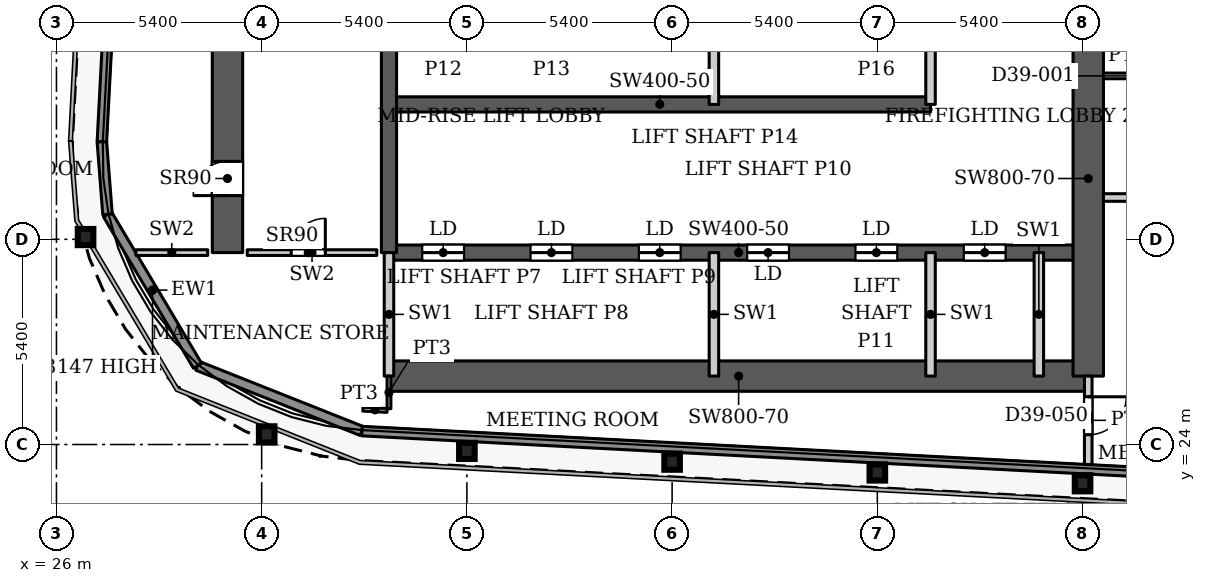
"""IFC4 building model, lengths in metres.
Left out: names, types, materials, properties, quantities, classifications, styles, units other than length and angle.
Written with IfcOpenShell. Run it as: python <this file> out.ifc"""

import sys

from ifc_helpers import new_model, si_unit, direction, frame, frame_2d, origin, origin_2d, place, context, subcontext, project, spatial, rectangle, i_section, extrude, source, transform, mapped, element, fill, save


model = new_model("IFC4")
c1 = context("Model", 3, precision=1e-05, world=origin(), true_north=direction((0.0, 1.0)))
c2 = subcontext(c1, "Body", "Model", "MODEL_VIEW")
j1 = project(units=[si_unit("LENGTHUNIT", "METRE"), si_unit("PLANEANGLEUNIT", "RADIAN")], contexts=[c1])
p1 = place(None, origin())
s1 = spatial("IfcSite", under=j1, at=p1, CompositionType="ELEMENT")
p2 = place(p1, origin())
s2 = spatial("IfcBuilding", under=s1, at=p2, CompositionType="ELEMENT")
p3 = place(p2, frame((0.0, 0.0, 168.2)))
s3 = spatial("IfcBuildingStorey", under=s2, at=p3, CompositionType="ELEMENT", Elevation=168.2)
for number, where, z_axis, x_axis in (
    (1, (53.0, 22.98, 0.0), (0.0, 0.0, 1.0), (1.0, 0.0, 0.0)),
    (2, (47.6, 23.264, 0.0), (0.0, 0.0, 1.0), (1.0, 0.0, 0.0)),
    (3, (42.2, 23.548, 0.0), (0.0, 0.0, 1.0), (1.0, 0.0, 0.0)),
    (4, (36.8, 23.832, 0.0), (0.0, 0.0, 1.0), (1.0, 0.0, 0.0)),
    (5, (31.532, 24.266, 0.0), (0.0, 0.0, 1.0), (1.0, 0.0, 0.0)),
    (6, (26.766, 29.459, 0.0), (0.0, 0.0, 1.0), (1.0, 0.0, 0.0)),
):
    element("IfcColumn", number, at=place(p3, frame(where, z_axis=z_axis, x_axis=x_axis)), inside=s3, PredefinedType="COLUMN", context=c2, shape_type="SweptSolid", body=[
        extrude(i_section(OverallWidth=0.409, OverallDepth=0.425, WebThickness=0.033, FlangeThickness=0.052, FilletRadius=0.013, at=origin_2d()), origin(), (0.0, 0.0, 1.0), 3.9),
    ])
p4 = place(p3, frame((34.75, 25.8, 0.0), z_axis=(0.0, 0.0, 1.0), x_axis=(1.0, 0.0, 0.0)))
e7 = element("IfcWall", 7, at=p4, inside=s3, PredefinedType="SHEAR", context=c2, shape_type="SweptSolid", body=[
    extrude(rectangle(XDim=18.4, YDim=0.8, at=frame_2d((9.2, 0.0))), origin(), (0.0, 0.0, 1.0), 3.9),
])
p5 = place(p3, frame((34.75, 29.05, 0.0), z_axis=(0.0, 0.0, 1.0), x_axis=(1.0, 0.0, 0.0)))
e8 = element("IfcWall", 8, at=p5, inside=s3, PredefinedType="SHEAR", context=c2, shape_type="SweptSolid", body=[
    extrude(rectangle(XDim=18.4, YDim=0.4, at=frame_2d((9.2, 0.0))), origin(), (0.0, 0.0, 1.0), 3.9),
])
p6 = place(p5, frame((0.875, 0.0, 0.0)))
e9 = element("IfcOpeningElement", 9, at=p6, cuts=e8, PredefinedType="OPENING", context=c2, shape_type="SweptSolid", body=[
    extrude(rectangle(XDim=1.1, YDim=2.2, at=frame_2d((0.55, 1.1))), frame((0.0, 0.21, 0.0), z_axis=(0.0, -1.0, 0.0), x_axis=(1.0, 0.0, 0.0)), (0.0, 0.0, 1.0), 0.42),
])
p7 = place(p5, frame((3.725, 0.0, 0.0)))
e10 = element("IfcOpeningElement", 10, at=p7, cuts=e8, PredefinedType="OPENING", context=c2, shape_type="SweptSolid", body=[
    extrude(rectangle(XDim=1.1, YDim=2.2, at=frame_2d((0.55, 1.1))), frame((0.0, 0.21, 0.0), z_axis=(0.0, -1.0, 0.0), x_axis=(1.0, 0.0, 0.0)), (0.0, 0.0, 1.0), 0.42),
])
p8 = place(p5, frame((6.575, 0.0, 0.0)))
e11 = element("IfcOpeningElement", 11, at=p8, cuts=e8, PredefinedType="OPENING", context=c2, shape_type="SweptSolid", body=[
    extrude(rectangle(XDim=1.1, YDim=2.2, at=frame_2d((0.55, 1.1))), frame((0.0, 0.21, 0.0), z_axis=(0.0, -1.0, 0.0), x_axis=(1.0, 0.0, 0.0)), (0.0, 0.0, 1.0), 0.42),
])
p9 = place(p5, frame((9.425, 0.0, 0.0)))
e12 = element("IfcOpeningElement", 12, at=p9, cuts=e8, PredefinedType="OPENING", context=c2, shape_type="SweptSolid", body=[
    extrude(rectangle(XDim=1.1, YDim=2.2, at=frame_2d((0.55, 1.1))), frame((0.0, 0.21, 0.0), z_axis=(0.0, -1.0, 0.0), x_axis=(1.0, 0.0, 0.0)), (0.0, 0.0, 1.0), 0.42),
])
p10 = place(p5, frame((12.275, 0.0, 0.0)))
e13 = element("IfcOpeningElement", 13, at=p10, cuts=e8, PredefinedType="OPENING", context=c2, shape_type="SweptSolid", body=[
    extrude(rectangle(XDim=1.1, YDim=2.2, at=frame_2d((0.55, 1.1))), frame((0.0, 0.21, 0.0), z_axis=(0.0, -1.0, 0.0), x_axis=(1.0, 0.0, 0.0)), (0.0, 0.0, 1.0), 0.42),
])
p11 = place(p5, frame((15.125, 0.0, 0.0)))
e14 = element("IfcOpeningElement", 14, at=p11, cuts=e8, PredefinedType="OPENING", context=c2, shape_type="SweptSolid", body=[
    extrude(rectangle(XDim=1.1, YDim=2.2, at=frame_2d((0.55, 1.1))), frame((0.0, 0.21, 0.0), z_axis=(0.0, -1.0, 0.0), x_axis=(1.0, 0.0, 0.0)), (0.0, 0.0, 1.0), 0.42),
])
p12 = place(p3, frame((34.75, 32.95, 0.0), z_axis=(0.0, 0.0, 1.0), x_axis=(1.0, 0.0, 0.0)))
e15 = element("IfcWall", 15, at=p12, inside=s3, PredefinedType="SHEAR", context=c2, shape_type="SweptSolid", body=[
    extrude(rectangle(XDim=14.25, YDim=0.4, at=frame_2d((7.125, 0.0))), origin(), (0.0, 0.0, 1.0), 3.9),
])
p13 = place(p3, frame((34.75, 29.05, 0.0), z_axis=(0.0, 0.0, 1.0), x_axis=(0.0, 1.0, 0.0)))
e16 = element("IfcWall", 16, at=p13, inside=s3, PredefinedType="SHEAR", context=c2, shape_type="SweptSolid", body=[
    extrude(rectangle(XDim=18.45, YDim=0.4, at=frame_2d((9.225, 0.0))), origin(), (0.0, 0.0, 1.0), 3.9),
])
p14 = place(p13, frame((8.025, 0.0, 0.0)))
e17 = element("IfcOpeningElement", 17, at=p14, cuts=e16, PredefinedType="OPENING", context=c2, shape_type="SweptSolid", body=[
    extrude(rectangle(XDim=1.1, YDim=2.2, at=frame_2d((0.55, 1.1))), frame((0.0, 0.21, 0.0), z_axis=(0.0, -1.0, 0.0), x_axis=(1.0, 0.0, 0.0)), (0.0, 0.0, 1.0), 0.42),
])
p15 = place(p13, frame((10.875, 0.0, 0.0)))
e18 = element("IfcOpeningElement", 18, at=p15, cuts=e16, PredefinedType="OPENING", context=c2, shape_type="SweptSolid", body=[
    extrude(rectangle(XDim=1.1, YDim=2.2, at=frame_2d((0.55, 1.1))), frame((0.0, 0.21, 0.0), z_axis=(0.0, -1.0, 0.0), x_axis=(1.0, 0.0, 0.0)), (0.0, 0.0, 1.0), 0.42),
])
p16 = place(p13, frame((13.725, 0.0, 0.0)))
e19 = element("IfcOpeningElement", 19, at=p16, cuts=e16, PredefinedType="OPENING", context=c2, shape_type="SweptSolid", body=[
    extrude(rectangle(XDim=1.1, YDim=2.2, at=frame_2d((0.55, 1.1))), frame((0.0, 0.21, 0.0), z_axis=(0.0, -1.0, 0.0), x_axis=(1.0, 0.0, 0.0)), (0.0, 0.0, 1.0), 0.42),
])
p17 = place(p13, frame((15.95, 0.0, 0.0)))
e20 = element("IfcOpeningElement", 20, at=p17, cuts=e16, PredefinedType="OPENING", context=c2, shape_type="SweptSolid", body=[
    extrude(rectangle(XDim=1.1, YDim=2.2, at=frame_2d((0.55, 1.1))), frame((0.0, 0.21, 0.0), z_axis=(0.0, -1.0, 0.0), x_axis=(1.0, 0.0, 0.0)), (0.0, 0.0, 1.0), 0.42),
])
p18 = place(p3, frame((30.5, 29.05, 0.0), z_axis=(0.0, 0.0, 1.0), x_axis=(0.0, 1.0, 0.0)))
e21 = element("IfcWall", 21, at=p18, inside=s3, PredefinedType="SHEAR", context=c2, shape_type="SweptSolid", body=[
    extrude(rectangle(XDim=18.45, YDim=0.8, at=frame_2d((9.225, 0.0))), origin(), (0.0, 0.0, 1.0), 3.9),
])
p19 = place(p18, frame((1.5, 0.0, 0.0)))
e22 = element("IfcOpeningElement", 22, at=p19, cuts=e21, PredefinedType="OPENING", context=c2, shape_type="SweptSolid", body=[
    extrude(rectangle(XDim=0.9, YDim=2.2, at=frame_2d((0.45, 1.1))), frame((0.0, 0.41, 0.0), z_axis=(0.0, -1.0, 0.0), x_axis=(1.0, 0.0, 0.0)), (0.0, 0.0, 1.0), 0.82),
])
p20 = place(p18, frame((7.406, 0.0, 0.0)))
e23 = element("IfcOpeningElement", 23, at=p20, cuts=e21, PredefinedType="OPENING", context=c2, shape_type="SweptSolid", body=[
    extrude(rectangle(XDim=0.9, YDim=2.2, at=frame_2d((0.45, 1.1))), frame((0.0, 0.41, 0.0), z_axis=(0.0, -1.0, 0.0), x_axis=(1.0, 0.0, 0.0)), (0.0, 0.0, 1.0), 0.82),
])
p21 = place(p18, frame((11.688, 0.0, 0.0)))
e24 = element("IfcOpeningElement", 24, at=p21, cuts=e21, PredefinedType="OPENING", context=c2, shape_type="SweptSolid", body=[
    extrude(rectangle(XDim=0.9, YDim=2.2, at=frame_2d((0.45, 1.1))), frame((0.0, 0.41, 0.0), z_axis=(0.0, -1.0, 0.0), x_axis=(1.0, 0.0, 0.0)), (0.0, 0.0, 1.0), 0.82),
])
p22 = place(p3, frame((53.15, 25.8, 0.0), z_axis=(0.0, 0.0, 1.0), x_axis=(0.0, 1.0, 0.0)))
e25 = element("IfcWall", 25, at=p22, inside=s3, PredefinedType="SHEAR", context=c2, shape_type="SweptSolid", body=[
    extrude(rectangle(XDim=10.4, YDim=0.8, at=frame_2d((5.2, 0.0))), origin(), (0.0, 0.0, 1.0), 3.9),
])
p23 = place(p3, frame((34.039, 24.353, 0.0), z_axis=(0.0, 0.0, 1.0), x_axis=(-0.929352825399, 0.369192803184, 0.0)))
e26 = element("IfcWall", 26, at=p23, inside=s3, PredefinedType="SOLIDWALL", context=c2, shape_type="SweptSolid", body=[
    extrude(rectangle(XDim=4.656, YDim=0.25, at=frame_2d((2.328, 0.0))), origin(), (0.0, 0.0, 1.0), 3.75),
])
p24 = place(p3, frame((29.712, 26.072, 0.0), z_axis=(0.0, 0.0, 1.0), x_axis=(-0.511028049012, 0.859564036662, 0.0)))
e27 = element("IfcWall", 27, at=p24, inside=s3, PredefinedType="SOLIDWALL", context=c2, shape_type="SweptSolid", body=[
    extrude(rectangle(XDim=4.634, YDim=0.25, at=frame_2d((2.317, 0.0))), origin(), (0.0, 0.0, 1.0), 3.147),
])
p25 = place(p3, frame((27.344, 30.055, 0.0), z_axis=(0.0, 0.0, 1.0), x_axis=(-0.077571675317, 0.99698677784, 0.0)))
e28 = element("IfcWall", 28, at=p25, inside=s3, PredefinedType="SOLIDWALL", context=c2, shape_type="SweptSolid", body=[
    extrude(rectangle(XDim=1.92, YDim=0.25, at=frame_2d((0.96, 0.0))), origin(), (0.0, 0.0, 1.0), 3.75),
])
p26 = place(p3, frame((27.195, 31.969, 0.0), z_axis=(0.0, 0.0, 1.0), x_axis=(0.052554995867, 0.998618031286, 0.0)))
e29 = element("IfcWall", 29, at=p26, inside=s3, PredefinedType="SOLIDWALL", context=c2, shape_type="SweptSolid", body=[
    extrude(rectangle(XDim=66.787, YDim=0.25, at=frame_2d((33.394, 0.0))), origin(), (0.0, 0.0, 1.0), 3.75),
])
p27 = place(p3, frame((95.186, 21.134, 0.0), z_axis=(0.0, 0.0, 1.0), x_axis=(-0.998617201448, 0.052570761569, 0.0)))
e30 = element("IfcWall", 30, at=p27, inside=s3, PredefinedType="SOLIDWALL", context=c2, shape_type="SweptSolid", body=[
    extrude(rectangle(XDim=61.232, YDim=0.25, at=frame_2d((30.616, 0.0))), origin(), (0.0, 0.0, 1.0), 3.75),
])
for number, where, z_axis, x_axis in (
    (31, (34.75, 25.8, 0.0), (0.0, 0.0, 1.0), (0.0, 1.0, 0.0)),
    (32, (43.3, 25.8, 0.0), (0.0, 0.0, 1.0), (0.0, 1.0, 0.0)),
    (33, (43.3, 32.95, 0.0), (0.0, 0.0, 1.0), (0.0, 1.0, 0.0)),
    (34, (49.0, 25.8, 0.0), (0.0, 0.0, 1.0), (0.0, 1.0, 0.0)),
    (35, (49.0, 32.95, 0.0), (0.0, 0.0, 1.0), (0.0, 1.0, 0.0)),
    (36, (51.85, 25.8, 0.0), (0.0, 0.0, 1.0), (0.0, 1.0, 0.0)),
):
    element("IfcWall", number, at=place(p3, frame(where, z_axis=z_axis, x_axis=x_axis)), inside=s3, PredefinedType="PARTITIONING", context=c2, shape_type="SweptSolid", body=[
        extrude(rectangle(XDim=3.25, YDim=0.25, at=frame_2d((1.625, 0.0))), origin(), (0.0, 0.0, 1.0), 3.9),
    ])
p28 = place(p3, frame((28.089, 29.05, 0.0), z_axis=(0.0, 0.0, 1.0), x_axis=(1.0, 0.0, 0.0)))
e37 = element("IfcWall", 37, at=p28, inside=s3, PredefinedType="PARTITIONING", context=c2, shape_type="SweptSolid", body=[
    extrude(rectangle(XDim=1.891, YDim=0.15, at=frame_2d((0.945, 0.0))), origin(), (0.0, 0.0, 1.0), 3.9),
])
p29 = place(p3, frame((31.02, 29.05, 0.0), z_axis=(0.0, 0.0, 1.0), x_axis=(1.0, 0.0, 0.0)))
e38 = element("IfcWall", 38, at=p29, inside=s3, PredefinedType="PARTITIONING", context=c2, shape_type="SweptSolid", body=[
    extrude(rectangle(XDim=3.41, YDim=0.15, at=frame_2d((1.705, 0.0))), origin(), (0.0, 0.0, 1.0), 3.9),
])
p30 = place(p29, frame((1.155, 0.0, 0.0)))
e39 = element("IfcOpeningElement", 39, at=p30, cuts=e38, PredefinedType="OPENING", context=c2, shape_type="SweptSolid", body=[
    extrude(rectangle(XDim=0.9, YDim=2.2, at=frame_2d((0.45, 1.1))), frame((0.0, 0.085, 0.0), z_axis=(0.0, -1.0, 0.0), x_axis=(1.0, 0.0, 0.0)), (0.0, 0.0, 1.0), 0.17),
])
p31 = place(p3, frame((34.063, 24.929, 0.0), z_axis=(0.0, 0.0, 1.0), x_axis=(0.998663963404, -0.051674831376, 0.0)))
e40 = element("IfcWall", 40, at=p31, inside=s3, PredefinedType="PARTITIONING", context=c2, shape_type="SweptSolid", body=[
    extrude(rectangle(XDim=0.638, YDim=0.1, at=frame_2d((0.319, 0.0))), origin(), (0.0, 0.0, 1.0), 3.6),
])
p32 = place(p3, frame((34.75, 24.942, 0.0), z_axis=(0.0, 0.0, 1.0), x_axis=(0.0, 1.0, 0.0)))
e41 = element("IfcWall", 41, at=p32, inside=s3, PredefinedType="PARTITIONING", context=c2, shape_type="SweptSolid", body=[
    extrude(rectangle(XDim=0.858, YDim=0.1, at=frame_2d((0.429, 0.0))), origin(), (0.0, 0.0, 1.0), 3.6),
])
p33 = place(p3, frame((53.15, 23.472, 0.0), z_axis=(0.0, 0.0, 1.0), x_axis=(0.0, 1.0, 0.0)))
e42 = element("IfcWall", 42, at=p33, inside=s3, PredefinedType="PARTITIONING", context=c2, shape_type="SweptSolid", body=[
    extrude(rectangle(XDim=2.328, YDim=0.2, at=frame_2d((1.164, 0.0))), origin(), (0.0, 0.0, 1.0), 3.6),
])
p34 = place(p33, frame((0.784, 0.0, 0.0)))
e43 = element("IfcOpeningElement", 43, at=p34, cuts=e42, PredefinedType="OPENING", context=c2, shape_type="SweptSolid", body=[
    extrude(rectangle(XDim=1.0, YDim=2.1, at=frame_2d((0.5, 1.05))), frame((0.0, 0.11, 0.0), z_axis=(0.0, -1.0, 0.0), x_axis=(1.0, 0.0, 0.0)), (0.0, 0.0, 1.0), 0.22),
])
p35 = place(p3, frame((53.549, 30.5, 0.0), z_axis=(0.0, 0.0, 1.0), x_axis=(1.0, 0.0, 0.0)))
e44 = element("IfcWall", 44, at=p35, inside=s3, PredefinedType="PARTITIONING", context=c2, shape_type="SweptSolid", body=[
    extrude(rectangle(XDim=39.151, YDim=0.2, at=frame_2d((19.575, 0.0))), origin(), (0.0, 0.0, 1.0), 3.6),
])
p36 = place(p35, frame((2.801, 0.0, 0.0)))
e45 = element("IfcOpeningElement", 45, at=p36, cuts=e44, PredefinedType="OPENING", context=c2, shape_type="SweptSolid", body=[
    extrude(rectangle(XDim=1.0, YDim=2.1, at=frame_2d((0.5, 1.05))), frame((0.0, 0.11, 0.0), z_axis=(0.0, -1.0, 0.0), x_axis=(1.0, 0.0, 0.0)), (0.0, 0.0, 1.0), 0.22),
])
p37 = place(p35, frame((9.851, 0.0, 0.0)))
e46 = element("IfcOpeningElement", 46, at=p37, cuts=e44, PredefinedType="OPENING", context=c2, shape_type="SweptSolid", body=[
    extrude(rectangle(XDim=1.0, YDim=2.1, at=frame_2d((0.5, 1.05))), frame((0.0, 0.11, 0.0), z_axis=(0.0, -1.0, 0.0), x_axis=(1.0, 0.0, 0.0)), (0.0, 0.0, 1.0), 0.22),
])
p38 = place(p35, frame((28.751, 0.0, 0.0)))
e47 = element("IfcOpeningElement", 47, at=p38, cuts=e44, PredefinedType="OPENING", context=c2, shape_type="SweptSolid", body=[
    extrude(rectangle(XDim=1.0, YDim=2.1, at=frame_2d((0.5, 1.05))), frame((0.0, 0.11, 0.0), z_axis=(0.0, -1.0, 0.0), x_axis=(1.0, 0.0, 0.0)), (0.0, 0.0, 1.0), 0.22),
])
p39 = place(p35, frame((32.651, 0.0, 0.0)))
e48 = element("IfcOpeningElement", 48, at=p39, cuts=e44, PredefinedType="OPENING", context=c2, shape_type="SweptSolid", body=[
    extrude(rectangle(XDim=1.0, YDim=2.1, at=frame_2d((0.5, 1.05))), frame((0.0, 0.11, 0.0), z_axis=(0.0, -1.0, 0.0), x_axis=(1.0, 0.0, 0.0)), (0.0, 0.0, 1.0), 0.22),
])
p40 = place(p3, frame((53.549, 33.7, 0.0), z_axis=(0.0, 0.0, 1.0), x_axis=(1.0, 0.0, 0.0)))
e49 = element("IfcWall", 49, at=p40, inside=s3, PredefinedType="PARTITIONING", context=c2, shape_type="SweptSolid", body=[
    extrude(rectangle(XDim=2.176, YDim=0.15, at=frame_2d((1.088, 0.0))), origin(), (0.0, 0.0, 1.0), 3.6),
])
p41 = place(p40, frame((0.651, 0.0, 0.0)))
e50 = element("IfcOpeningElement", 50, at=p41, cuts=e49, PredefinedType="OPENING", context=c2, shape_type="SweptSolid", body=[
    extrude(rectangle(XDim=0.8, YDim=2.1, at=frame_2d((0.4, 1.05))), frame((0.0, 0.085, 0.0), z_axis=(0.0, -1.0, 0.0), x_axis=(1.0, 0.0, 0.0)), (0.0, 0.0, 1.0), 0.17),
])
m1 = source(origin(), c2, "Body", "SweptSolid", [
    extrude(rectangle(XDim=1.1, YDim=2.2, at=frame_2d((0.55, 1.1))), frame((0.0, 0.025, 0.0), z_axis=(0.0, -1.0, 0.0), x_axis=(1.0, 0.0, 0.0)), (0.0, 0.0, 1.0), 0.05),
])
p42 = place(p6, origin())
e51 = element("IfcDoor", 51, at=p42, inside=s3, OperationType="SLIDING_TO_LEFT", PredefinedType="DOOR", context=c2, shape_type="MappedRepresentation", body=[
    mapped(m1, transform((0.0, 0.0, 0.0), x_axis=(1.0, 0.0, 0.0), y_axis=(0.0, 1.0, 0.0), z_axis=(0.0, 0.0, 1.0), scale=1.0)),
])
fill(e9, e51)
p43 = place(p7, origin())
e52 = element("IfcDoor", 52, at=p43, inside=s3, OperationType="SLIDING_TO_LEFT", PredefinedType="DOOR", context=c2, shape_type="MappedRepresentation", body=[
    mapped(m1, transform((0.0, 0.0, 0.0), x_axis=(1.0, 0.0, 0.0), y_axis=(0.0, 1.0, 0.0), z_axis=(0.0, 0.0, 1.0), scale=1.0)),
])
fill(e10, e52)
p44 = place(p8, origin())
e53 = element("IfcDoor", 53, at=p44, inside=s3, OperationType="SLIDING_TO_LEFT", PredefinedType="DOOR", context=c2, shape_type="MappedRepresentation", body=[
    mapped(m1, transform((0.0, 0.0, 0.0), x_axis=(1.0, 0.0, 0.0), y_axis=(0.0, 1.0, 0.0), z_axis=(0.0, 0.0, 1.0), scale=1.0)),
])
fill(e11, e53)
p45 = place(p9, origin())
e54 = element("IfcDoor", 54, at=p45, inside=s3, OperationType="SLIDING_TO_LEFT", PredefinedType="DOOR", context=c2, shape_type="MappedRepresentation", body=[
    mapped(m1, transform((0.0, 0.0, 0.0), x_axis=(1.0, 0.0, 0.0), y_axis=(0.0, 1.0, 0.0), z_axis=(0.0, 0.0, 1.0), scale=1.0)),
])
fill(e12, e54)
p46 = place(p10, origin())
e55 = element("IfcDoor", 55, at=p46, inside=s3, OperationType="SLIDING_TO_LEFT", PredefinedType="DOOR", context=c2, shape_type="MappedRepresentation", body=[
    mapped(m1, transform((0.0, 0.0, 0.0), x_axis=(1.0, 0.0, 0.0), y_axis=(0.0, 1.0, 0.0), z_axis=(0.0, 0.0, 1.0), scale=1.0)),
])
fill(e13, e55)
p47 = place(p11, origin())
e56 = element("IfcDoor", 56, at=p47, inside=s3, OperationType="SLIDING_TO_LEFT", PredefinedType="DOOR", context=c2, shape_type="MappedRepresentation", body=[
    mapped(m1, transform((0.0, 0.0, 0.0), x_axis=(1.0, 0.0, 0.0), y_axis=(0.0, 1.0, 0.0), z_axis=(0.0, 0.0, 1.0), scale=1.0)),
])
fill(e14, e56)
m2 = source(origin(), c2, "Body", "SweptSolid", [
    extrude(rectangle(XDim=0.9, YDim=2.2, at=frame_2d((0.45, 1.1))), frame((0.0, 0.025, 0.0), z_axis=(0.0, -1.0, 0.0), x_axis=(1.0, 0.0, 0.0)), (0.0, 0.0, 1.0), 0.05),
])
p48 = place(p19, origin())
e57 = element("IfcDoor", 57, at=p48, inside=s3, OperationType="SINGLE_SWING_LEFT", PredefinedType="DOOR", context=c2, shape_type="MappedRepresentation", body=[
    mapped(m2, transform((0.0, 0.0, 0.0), x_axis=(1.0, 0.0, 0.0), y_axis=(0.0, 1.0, 0.0), z_axis=(0.0, 0.0, 1.0), scale=1.0)),
])
fill(e22, e57)
p49 = place(p30, origin())
e58 = element("IfcDoor", 58, at=p49, inside=s3, OperationType="SINGLE_SWING_LEFT", PredefinedType="DOOR", context=c2, shape_type="MappedRepresentation", body=[
    mapped(m2, transform((0.0, 0.0, 0.0), x_axis=(1.0, 0.0, 0.0), y_axis=(0.0, 1.0, 0.0), z_axis=(0.0, 0.0, 1.0), scale=1.0)),
])
fill(e39, e58)
m3 = source(origin(), c2, "Body", "SweptSolid", [
    extrude(rectangle(XDim=1.0, YDim=2.1, at=frame_2d((0.5, 1.05))), frame((0.0, 0.025, 0.0), z_axis=(0.0, -1.0, 0.0), x_axis=(1.0, 0.0, 0.0)), (0.0, 0.0, 1.0), 0.05),
])
p50 = place(p34, origin())
e59 = element("IfcDoor", 59, at=p50, inside=s3, OperationType="SINGLE_SWING_RIGHT", PredefinedType="DOOR", context=c2, shape_type="MappedRepresentation", body=[
    mapped(m3, transform((0.0, 0.0, 0.0), x_axis=(1.0, 0.0, 0.0), y_axis=(0.0, 1.0, 0.0), z_axis=(0.0, 0.0, 1.0), scale=1.0)),
])
fill(e43, e59)
save(model, sys.argv[1])
